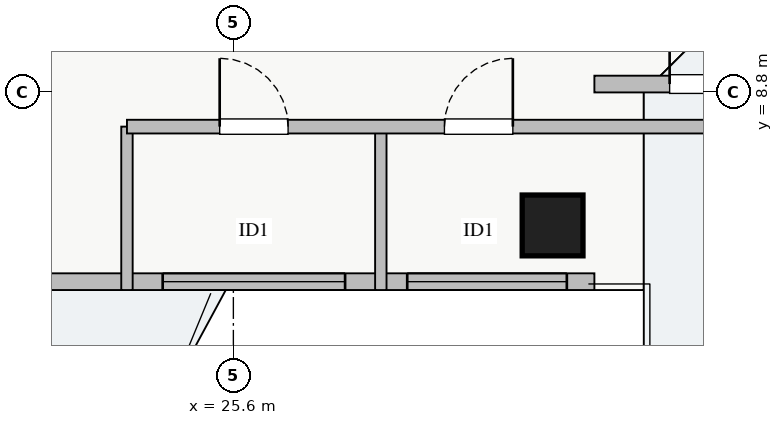
"""IFC4 building model, lengths in metres.
Left out: names, types, materials, properties, quantities, classifications, styles, units other than length and angle.
Written with IfcOpenShell. Run it as: python <this file> out.ifc"""

import sys

from ifc_helpers import new_model, si_unit, direction, frame, frame_2d, origin, origin_2d, place, context, subcontext, project, spatial, rectangle, extrude, source, transform, mapped, element, fill, save


model = new_model("IFC4")
c1 = context("Model", 3, precision=1e-05, world=origin(), true_north=direction((0.0, 1.0)))
c2 = subcontext(c1, "Body", "Model", "MODEL_VIEW")
j1 = project(units=[si_unit("LENGTHUNIT", "METRE"), si_unit("PLANEANGLEUNIT", "RADIAN")], contexts=[c1])
p1 = place(None, origin())
s1 = spatial("IfcSite", under=j1, at=p1, CompositionType="ELEMENT")
p2 = place(p1, origin())
s2 = spatial("IfcBuilding", under=s1, at=p2, CompositionType="ELEMENT")
p3 = place(p2, frame((0.0, 0.0, 213.25)))
s3 = spatial("IfcBuildingStorey", under=s2, at=p3, CompositionType="ELEMENT", Elevation=213.25)
m1 = source(origin(), c2, "Body", "SweptSolid", [
    extrude(rectangle(XDim=0.8, YDim=0.8, at=origin_2d()), origin(), (0.0, 0.0, 1.0), 3.25),
])
p4 = place(p3, frame((29.8, 7.05, 0.0), z_axis=(0.0, 0.0, 1.0), x_axis=(1.0, 0.0, 0.0)))
e1 = element("IfcColumn", 1, at=p4, inside=s3, PredefinedType="COLUMN", context=c2, shape_type="MappedRepresentation", body=[
    mapped(m1, transform((0.0, 0.0, 0.0), x_axis=(1.0, 0.0, 0.0), y_axis=(0.0, 1.0, 0.0), z_axis=(0.0, 0.0, 1.0), scale=1.0)),
])
p5 = place(p3, frame((7.65, 6.31, 0.0), z_axis=(0.0, 0.0, 1.0), x_axis=(1.0, 0.0, 0.0)))
e2 = element("IfcWall", 2, at=p5, inside=s3, PredefinedType="STANDARD", context=c2, shape_type="SweptSolid", body=[
    extrude(rectangle(XDim=22.7, YDim=0.22, at=frame_2d((11.35, 0.0))), origin(), (0.0, 0.0, 1.0), 2.61),
])
p6 = place(p5, frame((12.2, 0.0, 0.0)))
e3 = element("IfcOpeningElement", 3, at=p6, cuts=e2, PredefinedType="OPENING", context=c2, shape_type="SweptSolid", body=[
    extrude(rectangle(XDim=1.2, YDim=2.1, at=frame_2d((0.6, 1.05))), frame((0.0, 0.12, 0.0), z_axis=(0.0, -1.0, 0.0), x_axis=(1.0, 0.0, 0.0)), (0.0, 0.0, 1.0), 0.24),
])
p7 = place(p5, frame((1.637, 0.0, 0.9)))
e4 = element("IfcOpeningElement", 4, at=p7, cuts=e2, PredefinedType="OPENING", context=c2, shape_type="SweptSolid", body=[
    extrude(rectangle(XDim=2.4, YDim=1.48, at=frame_2d((1.2, 0.74))), frame((0.0, 0.12, 0.0), z_axis=(0.0, -1.0, 0.0), x_axis=(1.0, 0.0, 0.0)), (0.0, 0.0, 1.0), 0.24),
])
p8 = place(p5, frame((7.612, 0.0, 0.9)))
e5 = element("IfcOpeningElement", 5, at=p8, cuts=e2, PredefinedType="OPENING", context=c2, shape_type="SweptSolid", body=[
    extrude(rectangle(XDim=1.8, YDim=1.45, at=frame_2d((0.9, 0.725))), frame((0.0, 0.12, 0.0), z_axis=(0.0, -1.0, 0.0), x_axis=(1.0, 0.0, 0.0)), (0.0, 0.0, 1.0), 0.24),
])
p9 = place(p5, frame((20.238, 0.0, 0.9)))
e6 = element("IfcOpeningElement", 6, at=p9, cuts=e2, PredefinedType="OPENING", context=c2, shape_type="SweptSolid", body=[
    extrude(rectangle(XDim=2.1, YDim=1.5, at=frame_2d((1.05, 0.75))), frame((0.0, 0.12, 0.0), z_axis=(0.0, -1.0, 0.0), x_axis=(1.0, 0.0, 0.0)), (0.0, 0.0, 1.0), 0.24),
])
p10 = place(p5, frame((17.02, 0.0, 0.9)))
e7 = element("IfcOpeningElement", 7, at=p10, cuts=e2, PredefinedType="OPENING", context=c2, shape_type="SweptSolid", body=[
    extrude(rectangle(XDim=2.4, YDim=1.5, at=frame_2d((1.2, 0.75))), frame((0.0, 0.12, 0.0), z_axis=(0.0, -1.0, 0.0), x_axis=(1.0, 0.0, 0.0)), (0.0, 0.0, 1.0), 0.24),
])
p11 = place(p3, frame((30.35, 8.91, 0.0), z_axis=(0.0, 0.0, 1.0), x_axis=(1.0, 0.0, 0.0)))
e8 = element("IfcWall", 8, at=p11, inside=s3, PredefinedType="STANDARD", context=c2, shape_type="SweptSolid", body=[
    extrude(rectangle(XDim=2.74, YDim=0.22, at=frame_2d((1.37, 0.0))), origin(), (0.0, 0.0, 1.0), 2.61),
])
p12 = place(p11, frame((0.99, 0.0, 0.0)))
e9 = element("IfcOpeningElement", 9, at=p12, cuts=e8, PredefinedType="OPENING", context=c2, shape_type="SweptSolid", body=[
    extrude(rectangle(XDim=1.2, YDim=2.1, at=frame_2d((0.6, 1.05))), frame((0.0, 0.12, 0.0), z_axis=(0.0, -1.0, 0.0), x_axis=(1.0, 0.0, 0.0)), (0.0, 0.0, 1.0), 0.24),
])
for number, where, z_axis, x_axis in (
    (10, (24.2, 6.2, 0.0), (0.0, 0.0, 1.0), (0.0, 1.0, 0.0)),
    (11, (27.54, 6.2, 0.0), (0.0, 0.0, 1.0), (0.0, 1.0, 0.0)),
):
    element("IfcWall", number, at=place(p3, frame(where, z_axis=z_axis, x_axis=x_axis)), inside=s3, PredefinedType="PARTITIONING", context=c2, shape_type="SweptSolid", body=[
        extrude(rectangle(XDim=2.15, YDim=0.15, at=frame_2d((1.075, 0.0))), origin(), (0.0, 0.0, 1.0), 3.07),
    ])
p13 = place(p3, frame((24.2, 8.35, 0.0), z_axis=(0.0, 0.0, 1.0), x_axis=(1.0, 0.0, 0.0)))
e12 = element("IfcWall", 12, at=p13, inside=s3, PredefinedType="PARTITIONING", context=c2, shape_type="SweptSolid", body=[
    extrude(rectangle(XDim=8.25, YDim=0.18, at=frame_2d((4.125, 0.0))), origin(), (0.0, 0.0, 1.0), 3.07),
])
p14 = place(p13, frame((1.22, 0.0, 0.0)))
e13 = element("IfcOpeningElement", 13, at=p14, cuts=e12, PredefinedType="OPENING", context=c2, shape_type="SweptSolid", body=[
    extrude(rectangle(XDim=0.9, YDim=2.05, at=frame_2d((0.45, 1.025))), frame((0.0, 0.1, 0.0), z_axis=(0.0, -1.0, 0.0), x_axis=(1.0, 0.0, 0.0)), (0.0, 0.0, 1.0), 0.2),
])
p15 = place(p13, frame((4.177, 0.0, 0.0)))
e14 = element("IfcOpeningElement", 14, at=p15, cuts=e12, PredefinedType="OPENING", context=c2, shape_type="SweptSolid", body=[
    extrude(rectangle(XDim=0.9, YDim=2.05, at=frame_2d((0.45, 1.025))), frame((0.0, 0.1, 0.0), z_axis=(0.0, -1.0, 0.0), x_axis=(1.0, 0.0, 0.0)), (0.0, 0.0, 1.0), 0.2),
])
m2 = source(origin(), c2, "Body", "SweptSolid", [
    extrude(rectangle(XDim=2.1, YDim=1.5, at=frame_2d((1.05, 0.75))), frame((0.0, 0.03, 0.0), z_axis=(0.0, -1.0, 0.0), x_axis=(1.0, 0.0, 0.0)), (0.0, 0.0, 1.0), 0.06),
])
p16 = place(p9, origin())
e15 = element("IfcWindow", 15, at=p16, inside=s3, PartitioningType="TRIPLE_PANEL_VERTICAL", PredefinedType="WINDOW", context=c2, shape_type="MappedRepresentation", body=[
    mapped(m2, transform((0.0, 0.0, 0.0), x_axis=(1.0, 0.0, 0.0), y_axis=(0.0, 1.0, 0.0), z_axis=(0.0, 0.0, 1.0), scale=1.0)),
])
fill(e6, e15)
m3 = source(origin(), c2, "Body", "SweptSolid", [
    extrude(rectangle(XDim=1.2, YDim=2.1, at=frame_2d((0.6, 1.05))), frame((0.0, 0.025, 0.0), z_axis=(0.0, -1.0, 0.0), x_axis=(1.0, 0.0, 0.0)), (0.0, 0.0, 1.0), 0.05),
])
p17 = place(p12, origin())
e16 = element("IfcDoor", 16, at=p17, inside=s3, OperationType="SINGLE_SWING_LEFT", PredefinedType="DOOR", context=c2, shape_type="MappedRepresentation", body=[
    mapped(m3, transform((0.0, 0.0, 0.0), x_axis=(1.0, 0.0, 0.0), y_axis=(0.0, 1.0, 0.0), z_axis=(0.0, 0.0, 1.0), scale=1.0)),
])
fill(e9, e16)
m4 = source(origin(), c2, "Body", "SweptSolid", [
    extrude(rectangle(XDim=0.9, YDim=2.05, at=frame_2d((0.45, 1.025))), frame((0.0, 0.025, 0.0), z_axis=(0.0, -1.0, 0.0), x_axis=(1.0, 0.0, 0.0)), (0.0, 0.0, 1.0), 0.05),
])
p18 = place(p14, origin())
e17 = element("IfcDoor", 17, at=p18, inside=s3, OperationType="SINGLE_SWING_LEFT", PredefinedType="DOOR", context=c2, shape_type="MappedRepresentation", body=[
    mapped(m4, transform((0.0, 0.0, 0.0), x_axis=(1.0, 0.0, 0.0), y_axis=(0.0, 1.0, 0.0), z_axis=(0.0, 0.0, 1.0), scale=1.0)),
])
fill(e13, e17)
p19 = place(p15, origin())
e18 = element("IfcDoor", 18, at=p19, inside=s3, OperationType="SINGLE_SWING_RIGHT", PredefinedType="DOOR", context=c2, shape_type="MappedRepresentation", body=[
    mapped(m4, transform((0.0, 0.0, 0.0), x_axis=(1.0, 0.0, 0.0), y_axis=(0.0, 1.0, 0.0), z_axis=(0.0, 0.0, 1.0), scale=1.0)),
])
fill(e14, e18)
m5 = source(origin(), c2, "Body", "SweptSolid", [
    extrude(rectangle(XDim=2.4, YDim=1.5, at=frame_2d((1.2, 0.75))), frame((0.0, 0.03, 0.0), z_axis=(0.0, -1.0, 0.0), x_axis=(1.0, 0.0, 0.0)), (0.0, 0.0, 1.0), 0.06),
])
p20 = place(p10, origin())
e19 = element("IfcWindow", 19, at=p20, inside=s3, PartitioningType="TRIPLE_PANEL_VERTICAL", PredefinedType="WINDOW", context=c2, shape_type="MappedRepresentation", body=[
    mapped(m5, transform((0.0, 0.0, 0.0), x_axis=(1.0, 0.0, 0.0), y_axis=(0.0, 1.0, 0.0), z_axis=(0.0, 0.0, 1.0), scale=1.0)),
])
fill(e7, e19)
save(model, sys.argv[1])
